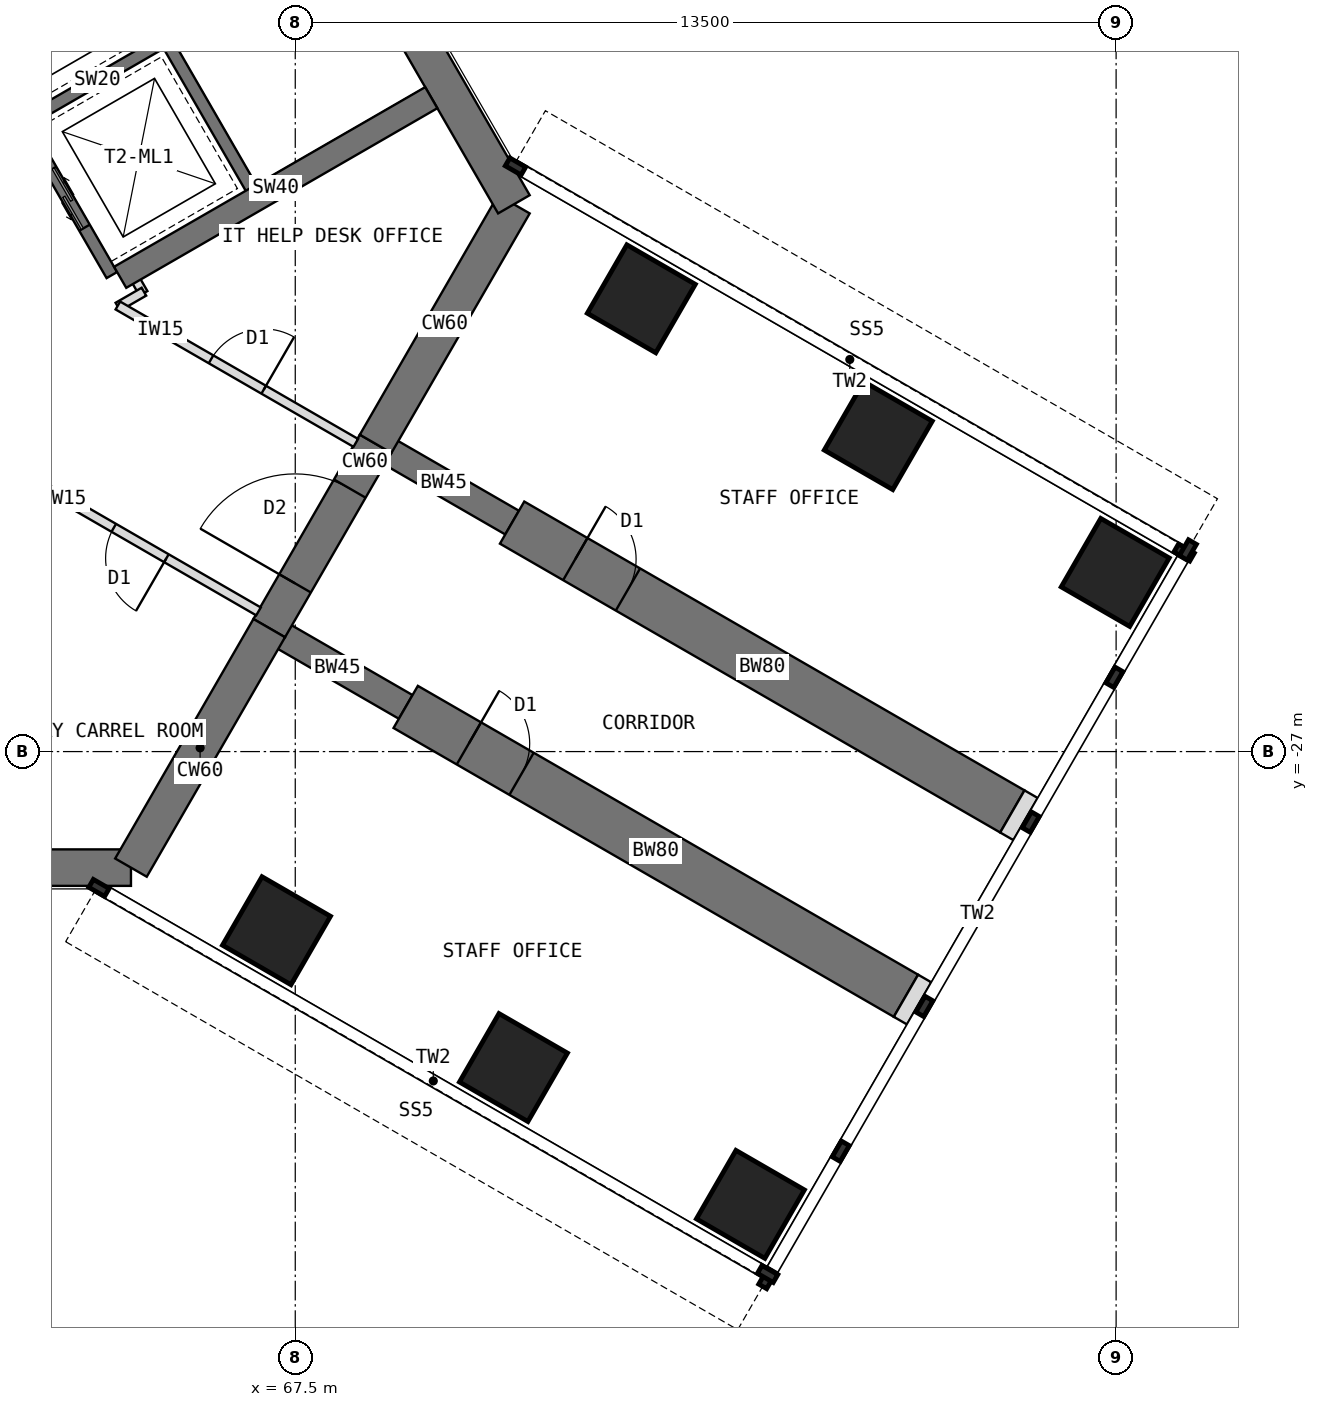
"""IFC4 building model, lengths in metres.
Left out: names, types, materials, properties, quantities, classifications, styles, units other than length and angle.
Written with IfcOpenShell. Run it as: python <this file> out.ifc"""

import sys

from ifc_helpers import new_model, si_unit, direction, frame, frame_2d, origin, origin_2d, place, context, subcontext, project, spatial, rectangle, extrude, element, fill, save


model = new_model("IFC4")
c1 = context("Model", 3, precision=1e-05, world=origin(), true_north=direction((0.0, 1.0)))
c2 = subcontext(c1, "Body", "Model", "MODEL_VIEW")
j1 = project(units=[si_unit("LENGTHUNIT", "METRE"), si_unit("PLANEANGLEUNIT", "RADIAN")], contexts=[c1])
p1 = place(None, origin())
s1 = spatial("IfcSite", under=j1, at=p1, CompositionType="ELEMENT")
p2 = place(p1, origin())
s2 = spatial("IfcBuilding", under=s1, at=p2, CompositionType="ELEMENT")
p3 = place(p2, frame((0.0, 0.0, 125.5)))
s3 = spatial("IfcBuildingStorey", under=s2, at=p3, CompositionType="ELEMENT", Elevation=125.5)
p4 = place(p3, frame((52.202, -28.908, 0.0), z_axis=(0.0, 0.0, 1.0), x_axis=(1.0, 0.0, 0.0)))
e1 = element("IfcWall", 1, at=p4, inside=s3, PredefinedType="SHEAR", context=c2, shape_type="SweptSolid", body=[
    extrude(rectangle(XDim=12.596, YDim=0.6, at=frame_2d((6.298, 0.0))), origin(), (0.0, 0.0, 1.0), 4.0),
])
p5 = place(p3, frame((64.798, -28.908, 0.0), z_axis=(0.0, 0.0, 1.0), x_axis=(0.499984222037, 0.866034513004, 0.0)))
e2 = element("IfcWall", 2, at=p5, inside=s3, PredefinedType="SHEAR", context=c2, shape_type="SweptSolid", body=[
    extrude(rectangle(XDim=4.548, YDim=0.6, at=frame_2d((2.274, 0.0))), origin(), (0.0, 0.0, 1.0), 4.0),
])
p6 = place(p3, frame((67.072, -24.97, 0.0), z_axis=(0.0, 0.0, 1.0), x_axis=(0.500010275428, 0.866019471182, 0.0)))
e3 = element("IfcWall", 3, at=p6, inside=s3, PredefinedType="SHEAR", context=c2, shape_type="SweptSolid", body=[
    extrude(rectangle(XDim=3.5, YDim=0.6, at=frame_2d((1.75, 0.0))), origin(), (0.0, 0.0, 1.0), 4.0),
])
p7 = place(p6, frame((0.85, 0.0, 0.0)))
e4 = element("IfcOpeningElement", 4, at=p7, cuts=e3, PredefinedType="OPENING", context=c2, shape_type="SweptSolid", body=[
    extrude(rectangle(XDim=1.8, YDim=2.1, at=frame_2d((0.9, 1.05))), frame((0.0, 0.31, 0.0), z_axis=(0.0, -1.0, 0.0), x_axis=(1.0, 0.0, 0.0)), (0.0, 0.0, 1.0), 0.62),
])
p8 = place(p3, frame((68.822, -21.939, 0.0), z_axis=(0.0, 0.0, 1.0), x_axis=(0.500024481964, 0.866011268655, 0.0)))
e5 = element("IfcWall", 5, at=p8, inside=s3, PredefinedType="SHEAR", context=c2, shape_type="SweptSolid", body=[
    extrude(rectangle(XDim=4.548, YDim=0.6, at=frame_2d((2.274, 0.0))), origin(), (0.0, 0.0, 1.0), 4.0),
])
p9 = place(p3, frame((71.096, -18.0, 0.0), z_axis=(0.0, 0.0, 1.0), x_axis=(-0.500005998175, 0.866021940709, 0.0)))
e6 = element("IfcWall", 6, at=p9, inside=s3, PredefinedType="SHEAR", context=c2, shape_type="SweptSolid", body=[
    extrude(rectangle(XDim=12.596, YDim=0.6, at=frame_2d((6.298, 0.0))), origin(), (0.0, 0.0, 1.0), 4.0),
])
p10 = place(p3, frame((68.822, -21.939, 0.0), z_axis=(0.0, 0.0, 1.0), x_axis=(0.866072649678, -0.499918158782, 0.0)))
e7 = element("IfcWall", 7, at=p10, inside=s3, PredefinedType="SHEAR", context=c2, shape_type="SweptSolid", body=[
    extrude(rectangle(XDim=2.592, YDim=0.45, at=frame_2d((1.296, 0.0))), origin(), (0.0, 0.0, 1.0), 4.0),
])
p11 = place(p3, frame((71.066, -23.234, 0.0), z_axis=(0.0, 0.0, 1.0), x_axis=(0.86602681393, -0.499997557548, 0.0)))
e8 = element("IfcWall", 8, at=p11, inside=s3, PredefinedType="SHEAR", context=c2, shape_type="SweptSolid", body=[
    extrude(rectangle(XDim=9.5, YDim=0.8, at=frame_2d((4.75, 0.0))), origin(), (0.0, 0.0, 1.0), 4.0),
])
p12 = place(p11, frame((1.2, 0.0, 0.0)))
e9 = element("IfcOpeningElement", 9, at=p12, cuts=e8, PredefinedType="OPENING", context=c2, shape_type="SweptSolid", body=[
    extrude(rectangle(XDim=1.0, YDim=2.1, at=frame_2d((0.5, 1.05))), frame((0.0, 0.41, 0.0), z_axis=(0.0, -1.0, 0.0), x_axis=(1.0, 0.0, 0.0)), (0.0, 0.0, 1.0), 0.82),
])
p13 = place(p3, frame((67.072, -24.97, 0.0), z_axis=(0.0, 0.0, 1.0), x_axis=(0.866031863473, -0.499988811324, 0.0)))
e10 = element("IfcWall", 10, at=p13, inside=s3, PredefinedType="SHEAR", context=c2, shape_type="SweptSolid", body=[
    extrude(rectangle(XDim=2.592, YDim=0.45, at=frame_2d((1.296, 0.0))), origin(), (0.0, 0.0, 1.0), 4.0),
])
p14 = place(p3, frame((69.316, -26.266, 0.0), z_axis=(0.0, 0.0, 1.0), x_axis=(0.86602681393, -0.499997557548, 0.0)))
e11 = element("IfcWall", 11, at=p14, inside=s3, PredefinedType="SHEAR", context=c2, shape_type="SweptSolid", body=[
    extrude(rectangle(XDim=9.5, YDim=0.8, at=frame_2d((4.75, 0.0))), origin(), (0.0, 0.0, 1.0), 4.0),
])
p15 = place(p14, frame((1.2, 0.0, 0.0)))
e12 = element("IfcOpeningElement", 12, at=p15, cuts=e11, PredefinedType="OPENING", context=c2, shape_type="SweptSolid", body=[
    extrude(rectangle(XDim=1.0, YDim=2.1, at=frame_2d((0.5, 1.05))), frame((0.0, 0.41, 0.0), z_axis=(0.0, -1.0, 0.0), x_axis=(1.0, 0.0, 0.0)), (0.0, 0.0, 1.0), 0.82),
])
for number, where, z_axis, x_axis in (
    (13, (73.191, -19.554, 0.0), (0.0, 0.0, 1.0), (0.5, 0.866, 0.0)),
    (14, (67.191, -29.946, 0.0), (0.0, 0.0, 1.0), (0.5, 0.866, 0.0)),
    (15, (77.088, -21.804, 0.0), (0.0, 0.0, 1.0), (0.5, 0.866, 0.0)),
    (16, (71.088, -32.196, 0.0), (0.0, 0.0, 1.0), (0.5, 0.866, 0.0)),
    (17, (80.986, -24.054, 0.0), (0.0, 0.0, 1.0), (0.5, 0.866, 0.0)),
    (18, (74.986, -34.446, 0.0), (0.0, 0.0, 1.0), (0.5, 0.866, 0.0)),
):
    element("IfcColumn", number, at=place(p3, frame(where, z_axis=z_axis, x_axis=x_axis)), inside=s3, PredefinedType="COLUMN", context=c2, shape_type="SweptSolid", body=[
        extrude(rectangle(XDim=1.3, YDim=1.3, at=origin_2d()), origin(), (0.0, 0.0, 1.0), 4.0),
    ])
for number, where, z_axis, x_axis in (
    (19, (79.294, -27.984, 0.0), (0.0, 0.0, 1.0), (0.866, -0.5, 0.0)),
    (20, (77.544, -31.016, 0.0), (0.0, 0.0, 1.0), (0.866, -0.5, 0.0)),
):
    element("IfcWall", number, at=place(p3, frame(where, z_axis=z_axis, x_axis=x_axis)), inside=s3, PredefinedType="PARTITIONING", context=c2, shape_type="SweptSolid", body=[
        extrude(rectangle(XDim=0.25, YDim=0.8, at=frame_2d((0.125, 0.0))), origin(), (0.0, 0.0, 1.0), 3.8),
    ])
p16 = place(p3, frame((64.484, -19.164, 0.0), z_axis=(0.0, 0.0, 1.0), x_axis=(-0.49999894854, 0.866026010844, 0.0)))
e21 = element("IfcWall", 21, at=p16, inside=s3, PredefinedType="SHEAR", context=c2, shape_type="SweptSolid", body=[
    extrude(rectangle(XDim=8.0, YDim=0.2, at=frame_2d((4.0, 0.0))), origin(), (0.0, 0.0, 1.0), 4.0),
])
p17 = place(p16, frame((6.3, 0.0, 0.0)))
e22 = element("IfcOpeningElement", 22, at=p17, cuts=e21, PredefinedType="OPENING", context=c2, shape_type="SweptSolid", body=[
    extrude(rectangle(XDim=1.2, YDim=2.1, at=frame_2d((0.6, 1.05))), frame((0.0, 0.11, 0.0), z_axis=(0.0, -1.0, 0.0), x_axis=(1.0, 0.0, 0.0)), (0.0, 0.0, 1.0), 0.22),
])
p18 = place(p16, frame((0.9, 0.0, 0.0)))
e23 = element("IfcOpeningElement", 23, at=p18, cuts=e21, PredefinedType="OPENING", context=c2, shape_type="SweptSolid", body=[
    extrude(rectangle(XDim=1.1, YDim=2.2, at=frame_2d((0.55, 1.1))), frame((0.0, 0.11, 0.0), z_axis=(0.0, -1.0, 0.0), x_axis=(1.0, 0.0, 0.0)), (0.0, 0.0, 1.0), 0.22),
])
p19 = place(p16, frame((3.8, 0.0, 0.0)))
e24 = element("IfcOpeningElement", 24, at=p19, cuts=e21, PredefinedType="OPENING", context=c2, shape_type="SweptSolid", body=[
    extrude(rectangle(XDim=1.1, YDim=2.2, at=frame_2d((0.55, 1.1))), frame((0.0, 0.11, 0.0), z_axis=(0.0, -1.0, 0.0), x_axis=(1.0, 0.0, 0.0)), (0.0, 0.0, 1.0), 0.22),
])
p20 = place(p3, frame((63.12, -16.603, 0.0), z_axis=(0.0, 0.0, 1.0), x_axis=(0.866062058628, 0.499936506574, 0.0)))
e25 = element("IfcWall", 25, at=p20, inside=s3, PredefinedType="SHEAR", context=c2, shape_type="SweptSolid", body=[
    extrude(rectangle(XDim=2.6, YDim=0.2, at=frame_2d((1.3, 0.0))), origin(), (0.0, 0.0, 1.0), 4.0),
])
p21 = place(p3, frame((66.822, -17.814, 0.0), z_axis=(0.0, 0.0, 1.0), x_axis=(-0.49999894854, 0.866026010844, 0.0)))
e26 = element("IfcWall", 26, at=p21, inside=s3, PredefinedType="SHEAR", context=c2, shape_type="SweptSolid", body=[
    extrude(rectangle(XDim=8.0, YDim=0.2, at=frame_2d((4.0, 0.0))), origin(), (0.0, 0.0, 1.0), 4.0),
])
p22 = place(p21, frame((6.7, 0.0, 0.0)))
e27 = element("IfcOpeningElement", 27, at=p22, cuts=e26, PredefinedType="OPENING", context=c2, shape_type="SweptSolid", body=[
    extrude(rectangle(XDim=1.1, YDim=2.1, at=frame_2d((0.55, 1.05))), frame((0.0, 0.11, 0.0), z_axis=(0.0, -1.0, 0.0), x_axis=(1.0, 0.0, 0.0)), (0.0, 0.0, 1.0), 0.22),
])
p23 = place(p3, frame((64.62, -19.201, 0.0), z_axis=(0.0, 0.0, 1.0), x_axis=(0.866027317282, 0.49999668571, 0.0)))
e28 = element("IfcWall", 28, at=p23, inside=s3, PredefinedType="SHEAR", context=c2, shape_type="SweptSolid", body=[
    extrude(rectangle(XDim=5.908, YDim=0.4, at=frame_2d((2.954, 0.0))), origin(), (0.0, 0.0, 1.0), 4.0),
])
p24 = place(p3, frame((64.789, -19.092, 0.0), z_axis=(0.0, 0.0, 1.0), x_axis=(0.499804398801, -0.866138304741, 0.0)))
e29 = element("IfcWall", 29, at=p24, inside=s3, PredefinedType="PARTITIONING", context=c2, shape_type="SweptSolid", body=[
    extrude(rectangle(XDim=0.43, YDim=0.15, at=frame_2d((0.215, 0.0))), origin(), (0.0, 0.0, 1.0), 3.8),
])
p25 = place(p3, frame((65.011, -19.437, 0.0), z_axis=(0.0, 0.0, 1.0), x_axis=(-0.865831790172, -0.50033519877, 0.0)))
e30 = element("IfcWall", 30, at=p25, inside=s3, PredefinedType="PARTITIONING", context=c2, shape_type="SweptSolid", body=[
    extrude(rectangle(XDim=0.494, YDim=0.15, at=frame_2d((0.247, 0.0))), origin(), (0.0, 0.0, 1.0), 3.8),
])
p26 = place(p3, frame((64.583, -19.664, 0.0), z_axis=(0.0, 0.0, 1.0), x_axis=(0.866006515865, -0.500032713409, 0.0)))
e31 = element("IfcWall", 31, at=p26, inside=s3, PredefinedType="PARTITIONING", context=c2, shape_type="SweptSolid", body=[
    extrude(rectangle(XDim=4.518, YDim=0.15, at=frame_2d((2.259, 0.0))), origin(), (0.0, 0.0, 1.0), 3.8),
])
p27 = place(p26, frame((1.769, 0.0, 0.0)))
e32 = element("IfcOpeningElement", 32, at=p27, cuts=e31, PredefinedType="OPENING", context=c2, shape_type="SweptSolid", body=[
    extrude(rectangle(XDim=1.0, YDim=2.1, at=frame_2d((0.5, 1.05))), frame((0.0, 0.085, 0.0), z_axis=(0.0, -1.0, 0.0), x_axis=(1.0, 0.0, 0.0)), (0.0, 0.0, 1.0), 0.17),
])
p28 = place(p3, frame((66.896, -24.695, 0.0), z_axis=(0.0, 0.0, 1.0), x_axis=(-0.86602002524, 0.500009315796, 0.0)))
e33 = element("IfcWall", 33, at=p28, inside=s3, PredefinedType="PARTITIONING", context=c2, shape_type="SweptSolid", body=[
    extrude(rectangle(XDim=4.519, YDim=0.15, at=frame_2d((2.259, 0.0))), origin(), (0.0, 0.0, 1.0), 3.8),
])
p29 = place(p28, frame((1.749, 0.0, 0.0)))
e34 = element("IfcOpeningElement", 34, at=p29, cuts=e33, PredefinedType="OPENING", context=c2, shape_type="SweptSolid", body=[
    extrude(rectangle(XDim=1.0, YDim=2.1, at=frame_2d((0.5, 1.05))), frame((0.0, 0.085, 0.0), z_axis=(0.0, -1.0, 0.0), x_axis=(1.0, 0.0, 0.0)), (0.0, 0.0, 1.0), 0.17),
])
p30 = place(p18, origin())
e35 = element("IfcDoor", 35, at=p30, inside=s3, OperationType="DOUBLE_DOOR_SLIDING", PredefinedType="DOOR", context=c2, shape_type="SweptSolid", body=[
    extrude(rectangle(XDim=1.1, YDim=2.2, at=frame_2d((0.55, 1.1))), frame((0.0, 0.025, 0.0), z_axis=(0.0, -1.0, 0.0), x_axis=(1.0, 0.0, 0.0)), (0.0, 0.0, 1.0), 0.05),
])
fill(e23, e35)
p31 = place(p7, origin())
e36 = element("IfcDoor", 36, at=p31, inside=s3, OperationType="DOUBLE_DOOR_DOUBLE_SWING", PredefinedType="DOOR", context=c2, shape_type="SweptSolid", body=[
    extrude(rectangle(XDim=1.72, YDim=2.06, at=frame_2d((0.9, 1.03))), frame((0.0, 0.025, 0.0), z_axis=(0.0, -1.0, 0.0), x_axis=(1.0, 0.0, 0.0)), (0.0, 0.0, 1.0), 0.05),
    extrude(rectangle(XDim=0.04, YDim=2.1, at=frame_2d((0.02, 1.05))), frame((0.0, 0.3, 0.0), z_axis=(0.0, -1.0, 0.0), x_axis=(1.0, 0.0, 0.0)), (0.0, 0.0, 1.0), 0.6),
    extrude(rectangle(XDim=0.04, YDim=2.1, at=frame_2d((1.78, 1.05))), frame((0.0, 0.3, 0.0), z_axis=(0.0, -1.0, 0.0), x_axis=(1.0, 0.0, 0.0)), (0.0, 0.0, 1.0), 0.6),
    extrude(rectangle(XDim=1.72, YDim=0.04, at=frame_2d((0.9, 2.08))), frame((0.0, 0.3, 0.0), z_axis=(0.0, -1.0, 0.0), x_axis=(1.0, 0.0, 0.0)), (0.0, 0.0, 1.0), 0.6),
])
fill(e4, e36)
p32 = place(p29, origin())
e37 = element("IfcDoor", 37, at=p32, inside=s3, OperationType="SINGLE_SWING_LEFT", PredefinedType="DOOR", context=c2, shape_type="SweptSolid", body=[
    extrude(rectangle(XDim=1.0, YDim=2.1, at=frame_2d((0.5, 1.05))), frame((0.0, 0.025, 0.0), z_axis=(0.0, -1.0, 0.0), x_axis=(1.0, 0.0, 0.0)), (0.0, 0.0, 1.0), 0.05),
])
fill(e34, e37)
p33 = place(p27, origin())
e38 = element("IfcDoor", 38, at=p33, inside=s3, OperationType="SINGLE_SWING_RIGHT", PredefinedType="DOOR", context=c2, shape_type="SweptSolid", body=[
    extrude(rectangle(XDim=1.0, YDim=2.1, at=frame_2d((0.5, 1.05))), frame((0.0, 0.025, 0.0), z_axis=(0.0, -1.0, 0.0), x_axis=(1.0, 0.0, 0.0)), (0.0, 0.0, 1.0), 0.05),
])
fill(e32, e38)
p34 = place(p12, origin())
e39 = element("IfcDoor", 39, at=p34, inside=s3, OperationType="SINGLE_SWING_LEFT", PredefinedType="DOOR", context=c2, shape_type="SweptSolid", body=[
    extrude(rectangle(XDim=0.92, YDim=2.06, at=frame_2d((0.5, 1.03))), frame((0.0, 0.025, 0.0), z_axis=(0.0, -1.0, 0.0), x_axis=(1.0, 0.0, 0.0)), (0.0, 0.0, 1.0), 0.05),
    extrude(rectangle(XDim=0.04, YDim=2.1, at=frame_2d((0.02, 1.05))), frame((0.0, 0.4, 0.0), z_axis=(0.0, -1.0, 0.0), x_axis=(1.0, 0.0, 0.0)), (0.0, 0.0, 1.0), 0.8),
    extrude(rectangle(XDim=0.04, YDim=2.1, at=frame_2d((0.98, 1.05))), frame((0.0, 0.4, 0.0), z_axis=(0.0, -1.0, 0.0), x_axis=(1.0, 0.0, 0.0)), (0.0, 0.0, 1.0), 0.8),
    extrude(rectangle(XDim=0.92, YDim=0.04, at=frame_2d((0.5, 2.08))), frame((0.0, 0.4, 0.0), z_axis=(0.0, -1.0, 0.0), x_axis=(1.0, 0.0, 0.0)), (0.0, 0.0, 1.0), 0.8),
])
fill(e9, e39)
p35 = place(p15, origin())
e40 = element("IfcDoor", 40, at=p35, inside=s3, OperationType="SINGLE_SWING_LEFT", PredefinedType="DOOR", context=c2, shape_type="SweptSolid", body=[
    extrude(rectangle(XDim=0.92, YDim=2.06, at=frame_2d((0.5, 1.03))), frame((0.0, 0.025, 0.0), z_axis=(0.0, -1.0, 0.0), x_axis=(1.0, 0.0, 0.0)), (0.0, 0.0, 1.0), 0.05),
    extrude(rectangle(XDim=0.04, YDim=2.1, at=frame_2d((0.02, 1.05))), frame((0.0, 0.4, 0.0), z_axis=(0.0, -1.0, 0.0), x_axis=(1.0, 0.0, 0.0)), (0.0, 0.0, 1.0), 0.8),
    extrude(rectangle(XDim=0.04, YDim=2.1, at=frame_2d((0.98, 1.05))), frame((0.0, 0.4, 0.0), z_axis=(0.0, -1.0, 0.0), x_axis=(1.0, 0.0, 0.0)), (0.0, 0.0, 1.0), 0.8),
    extrude(rectangle(XDim=0.92, YDim=0.04, at=frame_2d((0.5, 2.08))), frame((0.0, 0.4, 0.0), z_axis=(0.0, -1.0, 0.0), x_axis=(1.0, 0.0, 0.0)), (0.0, 0.0, 1.0), 0.8),
])
fill(e12, e40)
save(model, sys.argv[1])
